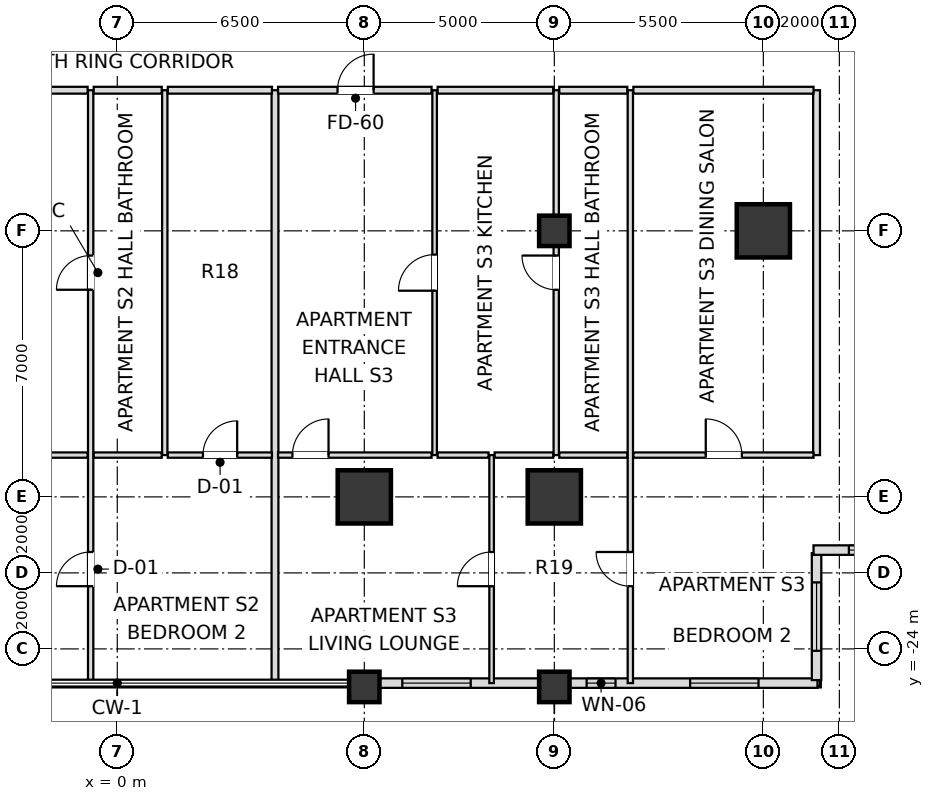
"""IFC4 building model, lengths in metres.
Left out: names, types, materials, properties, quantities, classifications, styles, units other than length and angle.
Written with IfcOpenShell. Run it as: python <this file> out.ifc"""

import sys

from ifc_helpers import new_model, si_unit, direction, frame, frame_2d, origin, origin_2d, place, context, subcontext, project, spatial, rectangle, extrude, element, fill, save


model = new_model("IFC4")
c1 = context("Model", 3, precision=1e-05, world=origin(), true_north=direction((0.0, 1.0)))
c2 = subcontext(c1, "Body", "Model", "MODEL_VIEW")
j1 = project(units=[si_unit("LENGTHUNIT", "METRE"), si_unit("PLANEANGLEUNIT", "RADIAN")], contexts=[c1])
p1 = place(None, origin())
s1 = spatial("IfcSite", under=j1, at=p1, CompositionType="ELEMENT")
p2 = place(p1, origin())
s2 = spatial("IfcBuilding", under=s1, at=p2, CompositionType="ELEMENT")
p3 = place(p2, frame((0.0, 0.0, 27.6)))
s3 = spatial("IfcBuildingStorey", under=s2, at=p3, CompositionType="ELEMENT", Elevation=27.6)
for number, where, z_axis, x_axis in (
    (1, (6.5, -20.0, 0.0), (0.0, 0.0, 1.0), (1.0, 0.0, 0.0)),
    (2, (11.5, -20.0, 0.0), (0.0, 0.0, 1.0), (1.0, 0.0, 0.0)),
    (3, (17.0, -13.0, 0.0), (0.0, 0.0, 1.0), (1.0, 0.0, 0.0)),
):
    element("IfcColumn", number, at=place(p3, frame(where, z_axis=z_axis, x_axis=x_axis)), inside=s3, PredefinedType="USERDEFINED", context=c2, shape_type="SweptSolid", body=[
        extrude(rectangle(XDim=1.4, YDim=1.4, at=origin_2d()), origin(), (0.0, 0.0, 1.0), 4.8),
    ])
for number, where, z_axis, x_axis in (
    (4, (11.5, -13.0, 0.0), (0.0, 0.0, 1.0), (1.0, 0.0, 0.0)),
    (5, (6.5, -25.0, 0.0), (0.0, 0.0, 1.0), (1.0, 0.0, 0.0)),
    (6, (11.5, -25.0, 0.0), (0.0, 0.0, 1.0), (1.0, 0.0, 0.0)),
):
    element("IfcColumn", number, at=place(p3, frame(where, z_axis=z_axis, x_axis=x_axis)), inside=s3, PredefinedType="COLUMN", context=c2, shape_type="SweptSolid", body=[
        extrude(rectangle(XDim=0.8, YDim=0.8, at=origin_2d()), origin(), (0.0, 0.0, 1.0), 4.8),
    ])
p4 = place(p3, frame((6.895, -24.9, 0.0), z_axis=(0.0, 0.0, 1.0), x_axis=(1.0, 0.0, 0.0)))
e7 = element("IfcWall", 7, at=p4, inside=s3, PredefinedType="SOLIDWALL", context=c2, shape_type="SweptSolid", body=[
    extrude(rectangle(XDim=4.21, YDim=0.25, at=frame_2d((2.105, 0.0))), origin(), (0.0, 0.0, 1.0), 3.936),
])
p5 = place(p4, frame((0.605, 0.0, 0.72)))
e8 = element("IfcOpeningElement", 8, at=p5, cuts=e7, PredefinedType="OPENING", context=c2, shape_type="SweptSolid", body=[
    extrude(rectangle(XDim=1.8, YDim=1.68, at=frame_2d((0.9, 0.84))), frame((0.0, 0.135, 0.0), z_axis=(0.0, -1.0, 0.0), x_axis=(1.0, 0.0, 0.0)), (0.0, 0.0, 1.0), 0.27),
])
p6 = place(p3, frame((11.895, -24.9, 0.0), z_axis=(0.0, 0.0, 1.0), x_axis=(1.0, 0.0, 0.0)))
e9 = element("IfcWall", 9, at=p6, inside=s3, PredefinedType="SOLIDWALL", context=c2, shape_type="SweptSolid", body=[
    extrude(rectangle(XDim=6.53, YDim=0.25, at=frame_2d((3.265, 0.0))), origin(), (0.0, 0.0, 1.0), 3.936),
])
p7 = place(p6, frame((0.455, 0.0, 0.72)))
e10 = element("IfcOpeningElement", 10, at=p7, cuts=e9, PredefinedType="OPENING", context=c2, shape_type="SweptSolid", body=[
    extrude(rectangle(XDim=0.76, YDim=1.68, at=frame_2d((0.38, 0.84))), frame((0.0, 0.135, 0.0), z_axis=(0.0, -1.0, 0.0), x_axis=(1.0, 0.0, 0.0)), (0.0, 0.0, 1.0), 0.27),
])
p8 = place(p6, frame((3.178, 0.0, 0.72)))
e11 = element("IfcOpeningElement", 11, at=p8, cuts=e9, PredefinedType="OPENING", context=c2, shape_type="SweptSolid", body=[
    extrude(rectangle(XDim=1.8, YDim=1.68, at=frame_2d((0.9, 0.84))), frame((0.0, 0.135, 0.0), z_axis=(0.0, -1.0, 0.0), x_axis=(1.0, 0.0, 0.0)), (0.0, 0.0, 1.0), 0.27),
])
p9 = place(p3, frame((18.4, -24.82, 0.0), z_axis=(0.0, 0.0, 1.0), x_axis=(0.0, 1.0, 0.0)))
e12 = element("IfcWall", 12, at=p9, inside=s3, PredefinedType="SOLIDWALL", context=c2, shape_type="SweptSolid", body=[
    extrude(rectangle(XDim=3.34, YDim=0.25, at=frame_2d((1.67, 0.0))), origin(), (0.0, 0.0, 1.0), 3.936),
])
p10 = place(p9, frame((0.77, 0.0, 0.72)))
e13 = element("IfcOpeningElement", 13, at=p10, cuts=e12, PredefinedType="OPENING", context=c2, shape_type="SweptSolid", body=[
    extrude(rectangle(XDim=1.8, YDim=1.68, at=frame_2d((0.9, 0.84))), frame((0.0, 0.135, 0.0), z_axis=(0.0, -1.0, 0.0), x_axis=(1.0, 0.0, 0.0)), (0.0, 0.0, 1.0), 0.27),
])
p11 = place(p3, frame((18.32, -21.4, 0.0), z_axis=(0.0, 0.0, 1.0), x_axis=(1.0, 0.0, 0.0)))
e14 = element("IfcWall", 14, at=p11, inside=s3, PredefinedType="SOLIDWALL", context=c2, shape_type="SweptSolid", body=[
    extrude(rectangle(XDim=3.66, YDim=0.25, at=frame_2d((1.83, 0.0))), origin(), (0.0, 0.0, 1.0), 3.936),
])
p12 = place(p11, frame((0.93, 0.0, 0.72)))
e15 = element("IfcOpeningElement", 15, at=p12, cuts=e14, PredefinedType="OPENING", context=c2, shape_type="SweptSolid", body=[
    extrude(rectangle(XDim=1.8, YDim=1.68, at=frame_2d((0.9, 0.84))), frame((0.0, 0.135, 0.0), z_axis=(0.0, -1.0, 0.0), x_axis=(1.0, 0.0, 0.0)), (0.0, 0.0, 1.0), 0.27),
])
p13 = place(p3, frame((-0.7, -24.9, 0.0), z_axis=(0.0, 0.0, 1.0), x_axis=(0.0, 1.0, 0.0)))
e16 = element("IfcWall", 16, at=p13, inside=s3, PredefinedType="PARTITIONING", context=c2, shape_type="SweptSolid", body=[
    extrude(rectangle(XDim=15.6, YDim=0.14, at=frame_2d((7.8, 0.0))), origin(), (0.0, 0.0, 1.0), 4.016),
])
p14 = place(p13, frame((10.35, 0.0, 0.0)))
e17 = element("IfcOpeningElement", 17, at=p14, cuts=e16, PredefinedType="OPENING", context=c2, shape_type="SweptSolid", body=[
    extrude(rectangle(XDim=0.9, YDim=2.1, at=frame_2d((0.45, 1.05))), frame((0.0, 0.08, 0.0), z_axis=(0.0, -1.0, 0.0), x_axis=(1.0, 0.0, 0.0)), (0.0, 0.0, 1.0), 0.16),
])
p15 = place(p13, frame((2.55, 0.0, 0.0)))
e18 = element("IfcOpeningElement", 18, at=p15, cuts=e16, PredefinedType="OPENING", context=c2, shape_type="SweptSolid", body=[
    extrude(rectangle(XDim=0.9, YDim=2.1, at=frame_2d((0.45, 1.05))), frame((0.0, 0.08, 0.0), z_axis=(0.0, -1.0, 0.0), x_axis=(1.0, 0.0, 0.0)), (0.0, 0.0, 1.0), 0.16),
])
p16 = place(p3, frame((1.25, -18.9, 0.0), z_axis=(0.0, 0.0, 1.0), x_axis=(0.0, 1.0, 0.0)))
e19 = element("IfcWall", 19, at=p16, inside=s3, PredefinedType="PARTITIONING", context=c2, shape_type="SweptSolid", body=[
    extrude(rectangle(XDim=9.6, YDim=0.14, at=frame_2d((4.8, 0.0))), origin(), (0.0, 0.0, 1.0), 4.148),
])
p17 = place(p3, frame((4.15, -24.9, 0.0), z_axis=(0.0, 0.0, 1.0), x_axis=(0.0, 1.0, 0.0)))
e20 = element("IfcWall", 20, at=p17, inside=s3, PredefinedType="PARTITIONING", context=c2, shape_type="SweptSolid", body=[
    extrude(rectangle(XDim=15.6, YDim=0.18, at=frame_2d((7.8, 0.0))), origin(), (0.0, 0.0, 1.0), 4.016),
])
p18 = place(p3, frame((8.35, -18.9, 0.0), z_axis=(0.0, 0.0, 1.0), x_axis=(0.0, 1.0, 0.0)))
e21 = element("IfcWall", 21, at=p18, inside=s3, PredefinedType="PARTITIONING", context=c2, shape_type="SweptSolid", body=[
    extrude(rectangle(XDim=9.6, YDim=0.12, at=frame_2d((4.8, 0.0))), origin(), (0.0, 0.0, 1.0), 4.016),
])
p19 = place(p18, frame((4.325, 0.0, 0.0)))
e22 = element("IfcOpeningElement", 22, at=p19, cuts=e21, PredefinedType="OPENING", context=c2, shape_type="SweptSolid", body=[
    extrude(rectangle(XDim=0.95, YDim=2.1, at=frame_2d((0.475, 1.05))), frame((0.0, 0.07, 0.0), z_axis=(0.0, -1.0, 0.0), x_axis=(1.0, 0.0, 0.0)), (0.0, 0.0, 1.0), 0.14),
])
p20 = place(p3, frame((9.85, -24.9, 0.0), z_axis=(0.0, 0.0, 1.0), x_axis=(0.0, 1.0, 0.0)))
e23 = element("IfcWall", 23, at=p20, inside=s3, PredefinedType="PARTITIONING", context=c2, shape_type="SweptSolid", body=[
    extrude(rectangle(XDim=6.0, YDim=0.12, at=frame_2d((3.0, 0.0))), origin(), (0.0, 0.0, 1.0), 4.016),
])
p21 = place(p20, frame((2.55, 0.0, 0.0)))
e24 = element("IfcOpeningElement", 24, at=p21, cuts=e23, PredefinedType="OPENING", context=c2, shape_type="SweptSolid", body=[
    extrude(rectangle(XDim=0.9, YDim=2.1, at=frame_2d((0.45, 1.05))), frame((0.0, 0.07, 0.0), z_axis=(0.0, -1.0, 0.0), x_axis=(1.0, 0.0, 0.0)), (0.0, 0.0, 1.0), 0.14),
])
p22 = place(p3, frame((11.55, -18.9, 0.0), z_axis=(0.0, 0.0, 1.0), x_axis=(0.0, 1.0, 0.0)))
e25 = element("IfcWall", 25, at=p22, inside=s3, PredefinedType="PARTITIONING", context=c2, shape_type="SweptSolid", body=[
    extrude(rectangle(XDim=9.6, YDim=0.14, at=frame_2d((4.8, 0.0))), origin(), (0.0, 0.0, 1.0), 3.936),
])
p23 = place(p22, frame((4.35, 0.0, 0.0)))
e26 = element("IfcOpeningElement", 26, at=p23, cuts=e25, PredefinedType="OPENING", context=c2, shape_type="SweptSolid", body=[
    extrude(rectangle(XDim=0.9, YDim=2.1, at=frame_2d((0.45, 1.05))), frame((0.0, 0.08, 0.0), z_axis=(0.0, -1.0, 0.0), x_axis=(1.0, 0.0, 0.0)), (0.0, 0.0, 1.0), 0.16),
])
p24 = place(p3, frame((13.5, -24.9, 0.0), z_axis=(0.0, 0.0, 1.0), x_axis=(0.0, 1.0, 0.0)))
e27 = element("IfcWall", 27, at=p24, inside=s3, PredefinedType="PARTITIONING", context=c2, shape_type="SweptSolid", body=[
    extrude(rectangle(XDim=15.6, YDim=0.14, at=frame_2d((7.8, 0.0))), origin(), (0.0, 0.0, 1.0), 3.936),
])
p25 = place(p24, frame((2.55, 0.0, 0.0)))
e28 = element("IfcOpeningElement", 28, at=p25, cuts=e27, PredefinedType="OPENING", context=c2, shape_type="SweptSolid", body=[
    extrude(rectangle(XDim=0.9, YDim=2.1, at=frame_2d((0.45, 1.05))), frame((0.0, 0.08, 0.0), z_axis=(0.0, -1.0, 0.0), x_axis=(1.0, 0.0, 0.0)), (0.0, 0.0, 1.0), 0.16),
])
p26 = place(p3, frame((18.4, -18.9, 0.0), z_axis=(0.0, 0.0, 1.0), x_axis=(0.0, 1.0, 0.0)))
e29 = element("IfcWall", 29, at=p26, inside=s3, PredefinedType="PARTITIONING", context=c2, shape_type="SweptSolid", body=[
    extrude(rectangle(XDim=9.6, YDim=0.18, at=frame_2d((4.8, 0.0))), origin(), (0.0, 0.0, 1.0), 3.936),
])
p27 = place(p3, frame((-3.82, -18.9, 0.0), z_axis=(0.0, 0.0, 1.0), x_axis=(1.0, 0.0, 0.0)))
e30 = element("IfcWall", 30, at=p27, inside=s3, PredefinedType="PARTITIONING", context=c2, shape_type="SweptSolid", body=[
    extrude(rectangle(XDim=3.04, YDim=0.14, at=frame_2d((1.52, 0.0))), origin(), (0.0, 0.0, 1.0), 4.58),
])
p28 = place(p3, frame((-0.62, -18.9, 0.0), z_axis=(0.0, 0.0, 1.0), x_axis=(1.0, 0.0, 0.0)))
e31 = element("IfcWall", 31, at=p28, inside=s3, PredefinedType="PARTITIONING", context=c2, shape_type="SweptSolid", body=[
    extrude(rectangle(XDim=1.79, YDim=0.14, at=frame_2d((0.895, 0.0))), origin(), (0.0, 0.0, 1.0), 4.58),
])
p29 = place(p3, frame((1.33, -18.9, 0.0), z_axis=(0.0, 0.0, 1.0), x_axis=(1.0, 0.0, 0.0)))
e32 = element("IfcWall", 32, at=p29, inside=s3, PredefinedType="PARTITIONING", context=c2, shape_type="SweptSolid", body=[
    extrude(rectangle(XDim=2.74, YDim=0.14, at=frame_2d((1.37, 0.0))), origin(), (0.0, 0.0, 1.0), 4.58),
])
p30 = place(p29, frame((0.925, 0.0, 0.0)))
e33 = element("IfcOpeningElement", 33, at=p30, cuts=e32, PredefinedType="OPENING", context=c2, shape_type="SweptSolid", body=[
    extrude(rectangle(XDim=0.9, YDim=2.1, at=frame_2d((0.45, 1.05))), frame((0.0, 0.08, 0.0), z_axis=(0.0, -1.0, 0.0), x_axis=(1.0, 0.0, 0.0)), (0.0, 0.0, 1.0), 0.16),
])
p31 = place(p3, frame((4.23, -18.9, 0.0), z_axis=(0.0, 0.0, 1.0), x_axis=(1.0, 0.0, 0.0)))
e34 = element("IfcWall", 34, at=p31, inside=s3, PredefinedType="PARTITIONING", context=c2, shape_type="SweptSolid", body=[
    extrude(rectangle(XDim=4.04, YDim=0.14, at=frame_2d((2.02, 0.0))), origin(), (0.0, 0.0, 1.0), 4.016),
])
p32 = place(p31, frame((0.379, 0.0, 0.0)))
e35 = element("IfcOpeningElement", 35, at=p32, cuts=e34, PredefinedType="OPENING", context=c2, shape_type="SweptSolid", body=[
    extrude(rectangle(XDim=0.95, YDim=2.1, at=frame_2d((0.475, 1.05))), frame((0.0, 0.08, 0.0), z_axis=(0.0, -1.0, 0.0), x_axis=(1.0, 0.0, 0.0)), (0.0, 0.0, 1.0), 0.16),
])
p33 = place(p3, frame((8.43, -18.9, 0.0), z_axis=(0.0, 0.0, 1.0), x_axis=(1.0, 0.0, 0.0)))
e36 = element("IfcWall", 36, at=p33, inside=s3, PredefinedType="PARTITIONING", context=c2, shape_type="SweptSolid", body=[
    extrude(rectangle(XDim=1.34, YDim=0.14, at=frame_2d((0.67, 0.0))), origin(), (0.0, 0.0, 1.0), 4.58),
])
p34 = place(p3, frame((9.93, -18.9, 0.0), z_axis=(0.0, 0.0, 1.0), x_axis=(1.0, 0.0, 0.0)))
e37 = element("IfcWall", 37, at=p34, inside=s3, PredefinedType="PARTITIONING", context=c2, shape_type="SweptSolid", body=[
    extrude(rectangle(XDim=1.54, YDim=0.14, at=frame_2d((0.77, 0.0))), origin(), (0.0, 0.0, 1.0), 4.58),
])
p35 = place(p3, frame((11.63, -18.9, 0.0), z_axis=(0.0, 0.0, 1.0), x_axis=(1.0, 0.0, 0.0)))
e38 = element("IfcWall", 38, at=p35, inside=s3, PredefinedType="PARTITIONING", context=c2, shape_type="SweptSolid", body=[
    extrude(rectangle(XDim=1.79, YDim=0.14, at=frame_2d((0.895, 0.0))), origin(), (0.0, 0.0, 1.0), 3.936),
])
p36 = place(p3, frame((13.58, -18.9, 0.0), z_axis=(0.0, 0.0, 1.0), x_axis=(1.0, 0.0, 0.0)))
e39 = element("IfcWall", 39, at=p36, inside=s3, PredefinedType="PARTITIONING", context=c2, shape_type="SweptSolid", body=[
    extrude(rectangle(XDim=4.74, YDim=0.14, at=frame_2d((2.37, 0.0))), origin(), (0.0, 0.0, 1.0), 3.936),
])
p37 = place(p36, frame((1.905, 0.0, 0.0)))
e40 = element("IfcOpeningElement", 40, at=p37, cuts=e39, PredefinedType="OPENING", context=c2, shape_type="SweptSolid", body=[
    extrude(rectangle(XDim=0.95, YDim=2.1, at=frame_2d((0.475, 1.05))), frame((0.0, 0.08, 0.0), z_axis=(0.0, -1.0, 0.0), x_axis=(1.0, 0.0, 0.0)), (0.0, 0.0, 1.0), 0.16),
])
p38 = place(p3, frame((-3.82, -9.3, 0.0), z_axis=(0.0, 0.0, 1.0), x_axis=(1.0, 0.0, 0.0)))
e41 = element("IfcWall", 41, at=p38, inside=s3, PredefinedType="PARTITIONING", context=c2, shape_type="SweptSolid", body=[
    extrude(rectangle(XDim=3.04, YDim=0.18, at=frame_2d((1.52, 0.0))), origin(), (0.0, 0.0, 1.0), 4.58),
])
p39 = place(p3, frame((-0.62, -9.3, 0.0), z_axis=(0.0, 0.0, 1.0), x_axis=(1.0, 0.0, 0.0)))
e42 = element("IfcWall", 42, at=p39, inside=s3, PredefinedType="PARTITIONING", context=c2, shape_type="SweptSolid", body=[
    extrude(rectangle(XDim=1.79, YDim=0.18, at=frame_2d((0.895, 0.0))), origin(), (0.0, 0.0, 1.0), 4.58),
])
p40 = place(p3, frame((1.33, -9.3, 0.0), z_axis=(0.0, 0.0, 1.0), x_axis=(1.0, 0.0, 0.0)))
e43 = element("IfcWall", 43, at=p40, inside=s3, PredefinedType="PARTITIONING", context=c2, shape_type="SweptSolid", body=[
    extrude(rectangle(XDim=2.74, YDim=0.18, at=frame_2d((1.37, 0.0))), origin(), (0.0, 0.0, 1.0), 4.58),
])
p41 = place(p3, frame((4.23, -9.3, 0.0), z_axis=(0.0, 0.0, 1.0), x_axis=(1.0, 0.0, 0.0)))
e44 = element("IfcWall", 44, at=p41, inside=s3, PredefinedType="PARTITIONING", context=c2, shape_type="SweptSolid", body=[
    extrude(rectangle(XDim=4.04, YDim=0.18, at=frame_2d((2.02, 0.0))), origin(), (0.0, 0.0, 1.0), 4.016),
])
p42 = place(p41, frame((1.565, 0.0, 0.0)))
e45 = element("IfcOpeningElement", 45, at=p42, cuts=e44, PredefinedType="OPENING", context=c2, shape_type="SweptSolid", body=[
    extrude(rectangle(XDim=0.95, YDim=2.15, at=frame_2d((0.475, 1.075))), frame((0.0, 0.1, 0.0), z_axis=(0.0, -1.0, 0.0), x_axis=(1.0, 0.0, 0.0)), (0.0, 0.0, 1.0), 0.2),
])
p43 = place(p3, frame((8.43, -9.3, 0.0), z_axis=(0.0, 0.0, 1.0), x_axis=(1.0, 0.0, 0.0)))
e46 = element("IfcWall", 46, at=p43, inside=s3, PredefinedType="PARTITIONING", context=c2, shape_type="SweptSolid", body=[
    extrude(rectangle(XDim=3.04, YDim=0.18, at=frame_2d((1.52, 0.0))), origin(), (0.0, 0.0, 1.0), 4.58),
])
p44 = place(p3, frame((11.63, -9.3, 0.0), z_axis=(0.0, 0.0, 1.0), x_axis=(1.0, 0.0, 0.0)))
e47 = element("IfcWall", 47, at=p44, inside=s3, PredefinedType="PARTITIONING", context=c2, shape_type="SweptSolid", body=[
    extrude(rectangle(XDim=1.79, YDim=0.18, at=frame_2d((0.895, 0.0))), origin(), (0.0, 0.0, 1.0), 4.58),
])
p45 = place(p3, frame((13.58, -9.3, 0.0), z_axis=(0.0, 0.0, 1.0), x_axis=(1.0, 0.0, 0.0)))
e48 = element("IfcWall", 48, at=p45, inside=s3, PredefinedType="PARTITIONING", context=c2, shape_type="SweptSolid", body=[
    extrude(rectangle(XDim=4.74, YDim=0.18, at=frame_2d((2.37, 0.0))), origin(), (0.0, 0.0, 1.0), 4.016),
])
p46 = place(p5, origin())
e49 = element("IfcWindow", 49, at=p46, inside=s3, PartitioningType="SINGLE_PANEL", PredefinedType="WINDOW", context=c2, shape_type="SweptSolid", body=[
    extrude(rectangle(XDim=1.8, YDim=1.68, at=frame_2d((0.9, 0.84))), frame((0.0, 0.03, 0.0), z_axis=(0.0, -1.0, 0.0), x_axis=(1.0, 0.0, 0.0)), (0.0, 0.0, 1.0), 0.06),
])
fill(e8, e49)
p47 = place(p7, origin())
e50 = element("IfcWindow", 50, at=p47, inside=s3, PartitioningType="SINGLE_PANEL", PredefinedType="WINDOW", context=c2, shape_type="SweptSolid", body=[
    extrude(rectangle(XDim=0.76, YDim=1.68, at=frame_2d((0.38, 0.84))), frame((0.0, 0.03, 0.0), z_axis=(0.0, -1.0, 0.0), x_axis=(1.0, 0.0, 0.0)), (0.0, 0.0, 1.0), 0.06),
])
fill(e10, e50)
p48 = place(p8, origin())
e51 = element("IfcWindow", 51, at=p48, inside=s3, PartitioningType="SINGLE_PANEL", PredefinedType="WINDOW", context=c2, shape_type="SweptSolid", body=[
    extrude(rectangle(XDim=1.8, YDim=1.68, at=frame_2d((0.9, 0.84))), frame((0.0, 0.03, 0.0), z_axis=(0.0, -1.0, 0.0), x_axis=(1.0, 0.0, 0.0)), (0.0, 0.0, 1.0), 0.06),
])
fill(e11, e51)
p49 = place(p10, origin())
e52 = element("IfcWindow", 52, at=p49, inside=s3, PartitioningType="SINGLE_PANEL", PredefinedType="WINDOW", context=c2, shape_type="SweptSolid", body=[
    extrude(rectangle(XDim=1.8, YDim=1.68, at=frame_2d((0.9, 0.84))), frame((0.0, 0.03, 0.0), z_axis=(0.0, -1.0, 0.0), x_axis=(1.0, 0.0, 0.0)), (0.0, 0.0, 1.0), 0.06),
])
fill(e13, e52)
p50 = place(p12, origin())
e53 = element("IfcWindow", 53, at=p50, inside=s3, PartitioningType="SINGLE_PANEL", PredefinedType="WINDOW", context=c2, shape_type="SweptSolid", body=[
    extrude(rectangle(XDim=1.8, YDim=1.68, at=frame_2d((0.9, 0.84))), frame((0.0, 0.03, 0.0), z_axis=(0.0, -1.0, 0.0), x_axis=(1.0, 0.0, 0.0)), (0.0, 0.0, 1.0), 0.06),
])
fill(e15, e53)
p51 = place(p14, origin())
e54 = element("IfcDoor", 54, at=p51, inside=s3, OperationType="SINGLE_SWING_LEFT", PredefinedType="DOOR", context=c2, shape_type="SweptSolid", body=[
    extrude(rectangle(XDim=0.9, YDim=2.1, at=frame_2d((0.45, 1.05))), frame((0.0, 0.025, 0.0), z_axis=(0.0, -1.0, 0.0), x_axis=(1.0, 0.0, 0.0)), (0.0, 0.0, 1.0), 0.05),
])
fill(e17, e54)
p52 = place(p30, origin())
e55 = element("IfcDoor", 55, at=p52, inside=s3, OperationType="SINGLE_SWING_RIGHT", PredefinedType="DOOR", context=c2, shape_type="SweptSolid", body=[
    extrude(rectangle(XDim=0.9, YDim=2.1, at=frame_2d((0.45, 1.05))), frame((0.0, 0.025, 0.0), z_axis=(0.0, -1.0, 0.0), x_axis=(1.0, 0.0, 0.0)), (0.0, 0.0, 1.0), 0.05),
])
fill(e33, e55)
p53 = place(p15, origin())
e56 = element("IfcDoor", 56, at=p53, inside=s3, OperationType="SINGLE_SWING_LEFT", PredefinedType="DOOR", context=c2, shape_type="SweptSolid", body=[
    extrude(rectangle(XDim=0.9, YDim=2.1, at=frame_2d((0.45, 1.05))), frame((0.0, 0.025, 0.0), z_axis=(0.0, -1.0, 0.0), x_axis=(1.0, 0.0, 0.0)), (0.0, 0.0, 1.0), 0.05),
])
fill(e18, e56)
p54 = place(p42, origin())
e57 = element("IfcDoor", 57, at=p54, inside=s3, OperationType="SINGLE_SWING_RIGHT", PredefinedType="DOOR", context=c2, shape_type="SweptSolid", body=[
    extrude(rectangle(XDim=0.95, YDim=2.15, at=frame_2d((0.475, 1.075))), frame((0.0, 0.025, 0.0), z_axis=(0.0, -1.0, 0.0), x_axis=(1.0, 0.0, 0.0)), (0.0, 0.0, 1.0), 0.05),
])
fill(e45, e57)
p55 = place(p19, origin())
e58 = element("IfcDoor", 58, at=p55, inside=s3, OperationType="SINGLE_SWING_LEFT", PredefinedType="DOOR", context=c2, shape_type="SweptSolid", body=[
    extrude(rectangle(XDim=0.95, YDim=2.1, at=frame_2d((0.475, 1.05))), frame((0.0, 0.025, 0.0), z_axis=(0.0, -1.0, 0.0), x_axis=(1.0, 0.0, 0.0)), (0.0, 0.0, 1.0), 0.05),
])
fill(e22, e58)
p56 = place(p23, origin())
e59 = element("IfcDoor", 59, at=p56, inside=s3, OperationType="SINGLE_SWING_RIGHT", PredefinedType="DOOR", context=c2, shape_type="SweptSolid", body=[
    extrude(rectangle(XDim=0.9, YDim=2.1, at=frame_2d((0.45, 1.05))), frame((0.0, 0.025, 0.0), z_axis=(0.0, -1.0, 0.0), x_axis=(1.0, 0.0, 0.0)), (0.0, 0.0, 1.0), 0.05),
])
fill(e26, e59)
p57 = place(p37, origin())
e60 = element("IfcDoor", 60, at=p57, inside=s3, OperationType="SINGLE_SWING_LEFT", PredefinedType="DOOR", context=c2, shape_type="SweptSolid", body=[
    extrude(rectangle(XDim=0.95, YDim=2.1, at=frame_2d((0.475, 1.05))), frame((0.0, 0.025, 0.0), z_axis=(0.0, -1.0, 0.0), x_axis=(1.0, 0.0, 0.0)), (0.0, 0.0, 1.0), 0.05),
])
fill(e40, e60)
p58 = place(p32, origin())
e61 = element("IfcDoor", 61, at=p58, inside=s3, OperationType="SINGLE_SWING_RIGHT", PredefinedType="DOOR", context=c2, shape_type="SweptSolid", body=[
    extrude(rectangle(XDim=0.95, YDim=2.1, at=frame_2d((0.475, 1.05))), frame((0.0, 0.025, 0.0), z_axis=(0.0, -1.0, 0.0), x_axis=(1.0, 0.0, 0.0)), (0.0, 0.0, 1.0), 0.05),
])
fill(e35, e61)
p59 = place(p21, origin())
e62 = element("IfcDoor", 62, at=p59, inside=s3, OperationType="SINGLE_SWING_LEFT", PredefinedType="DOOR", context=c2, shape_type="SweptSolid", body=[
    extrude(rectangle(XDim=0.9, YDim=2.1, at=frame_2d((0.45, 1.05))), frame((0.0, 0.025, 0.0), z_axis=(0.0, -1.0, 0.0), x_axis=(1.0, 0.0, 0.0)), (0.0, 0.0, 1.0), 0.05),
])
fill(e24, e62)
p60 = place(p25, origin())
e63 = element("IfcDoor", 63, at=p60, inside=s3, OperationType="SINGLE_SWING_RIGHT", PredefinedType="DOOR", context=c2, shape_type="SweptSolid", body=[
    extrude(rectangle(XDim=0.9, YDim=2.1, at=frame_2d((0.45, 1.05))), frame((0.0, 0.025, 0.0), z_axis=(0.0, -1.0, 0.0), x_axis=(1.0, 0.0, 0.0)), (0.0, 0.0, 1.0), 0.05),
])
fill(e28, e63)
save(model, sys.argv[1])
